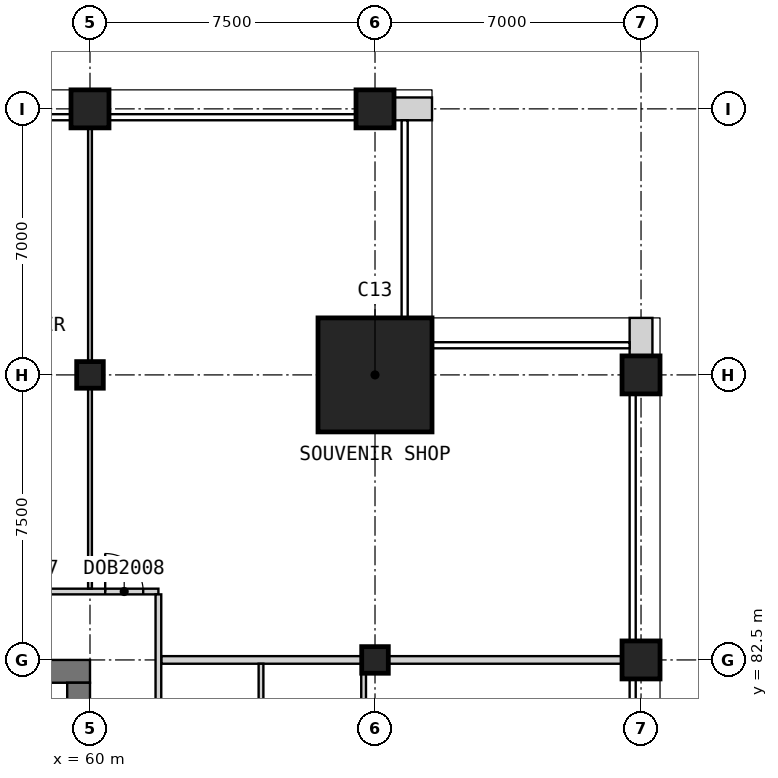
"""IFC4 building model, lengths in metres.
Left out: names, types, materials, properties, quantities, classifications, styles, units other than length and angle.
Written with IfcOpenShell. Run it as: python <this file> out.ifc"""

import sys

from ifc_helpers import new_model, si_unit, direction, frame, frame_2d, origin, origin_2d, place, context, subcontext, project, spatial, rectangle, extrude, element, fill, save


model = new_model("IFC4")
c1 = context("Model", 3, precision=1e-05, world=origin(), true_north=direction((0.0, 1.0)))
c2 = subcontext(c1, "Body", "Model", "MODEL_VIEW")
j1 = project(units=[si_unit("LENGTHUNIT", "METRE"), si_unit("PLANEANGLEUNIT", "RADIAN")], contexts=[c1])
p1 = place(None, origin())
s1 = spatial("IfcSite", under=j1, at=p1, CompositionType="ELEMENT")
p2 = place(p1, origin())
s2 = spatial("IfcBuilding", under=s1, at=p2, CompositionType="ELEMENT")
p3 = place(p2, frame((0.0, 0.0, 308.7)))
s3 = spatial("IfcBuildingStorey", under=s2, at=p3, CompositionType="ELEMENT", Elevation=308.7)
p4 = place(p3, frame((60.0, 90.0, 0.0), z_axis=(0.0, 0.0, 1.0), x_axis=(1.0, 0.0, 0.0)))
e1 = element("IfcColumn", 1, at=p4, inside=s3, PredefinedType="COLUMN", context=c2, shape_type="SweptSolid", body=[
    extrude(rectangle(XDim=0.7, YDim=0.7, at=origin_2d()), origin(), (0.0, 0.0, 1.0), 6.0),
])
p5 = place(p3, frame((60.0, 97.0, 0.0), z_axis=(0.0, 0.0, 1.0), x_axis=(1.0, 0.0, 0.0)))
e2 = element("IfcColumn", 2, at=p5, inside=s3, PredefinedType="COLUMN", context=c2, shape_type="SweptSolid", body=[
    extrude(rectangle(XDim=1.0, YDim=1.0, at=origin_2d()), origin(), (0.0, 0.0, 1.0), 6.0),
])
p6 = place(p3, frame((67.5, 82.5, 0.0), z_axis=(0.0, 0.0, 1.0), x_axis=(1.0, 0.0, 0.0)))
e3 = element("IfcColumn", 3, at=p6, inside=s3, PredefinedType="COLUMN", context=c2, shape_type="SweptSolid", body=[
    extrude(rectangle(XDim=0.7, YDim=0.7, at=origin_2d()), origin(), (0.0, 0.0, 1.0), 6.0),
])
for number, where, z_axis, x_axis in (
    (4, (67.5, 97.0, 0.0), (0.0, 0.0, 1.0), (1.0, 0.0, 0.0)),
    (5, (74.5, 82.5, 0.0), (0.0, 0.0, 1.0), (1.0, 0.0, 0.0)),
    (6, (74.5, 90.0, 0.0), (0.0, 0.0, 1.0), (1.0, 0.0, 0.0)),
):
    element("IfcColumn", number, at=place(p3, frame(where, z_axis=z_axis, x_axis=x_axis)), inside=s3, PredefinedType="COLUMN", context=c2, shape_type="SweptSolid", body=[
        extrude(rectangle(XDim=1.0, YDim=1.0, at=origin_2d()), origin(), (0.0, 0.0, 1.0), 6.0),
    ])
p7 = place(p3, frame((67.5, 90.0, 0.0), z_axis=(0.0, 0.0, 1.0), x_axis=(1.0, 0.0, 0.0)))
e7 = element("IfcColumn", 7, at=p7, inside=s3, PredefinedType="COLUMN", context=c2, shape_type="SweptSolid", body=[
    extrude(rectangle(XDim=3.0, YDim=3.0, at=origin_2d()), origin(), (0.0, 0.0, 1.0), 6.0),
])
p8 = place(p3, frame((30.0, 82.2, 0.0), z_axis=(0.0, 0.0, 1.0), x_axis=(1.0, 0.0, 0.0)))
e8 = element("IfcWall", 8, at=p8, inside=s3, PredefinedType="SHEAR", context=c2, shape_type="SweptSolid", body=[
    extrude(rectangle(XDim=30.0, YDim=0.6, at=frame_2d((15.0, 0.0))), origin(), (0.0, 0.0, 1.0), 6.0),
])
p9 = place(p3, frame((59.7, 60.6, 0.0), z_axis=(0.0, 0.0, 1.0), x_axis=(0.0, 1.0, 0.0)))
e9 = element("IfcWall", 9, at=p9, inside=s3, PredefinedType="SHEAR", context=c2, shape_type="SweptSolid", body=[
    extrude(rectangle(XDim=21.3, YDim=0.6, at=frame_2d((10.65, 0.0))), origin(), (0.0, 0.0, 1.0), 6.0),
])
p10 = place(p9, frame((14.9, 0.0, 0.0)))
e10 = element("IfcOpeningElement", 10, at=p10, cuts=e9, PredefinedType="OPENING", context=c2, shape_type="SweptSolid", body=[
    extrude(rectangle(XDim=1.8, YDim=2.1, at=frame_2d((0.9, 1.05))), frame((0.0, 0.31, 0.0), z_axis=(0.0, -1.0, 0.0), x_axis=(1.0, 0.0, 0.0)), (0.0, 0.0, 1.0), 0.62),
])
for number, where, z_axis, x_axis in (
    (11, (74.5, 90.5, 0.0), (0.0, 0.0, 1.0), (0.0, 1.0, 0.0)),
    (12, (69.0, 97.0, 0.0), (0.0, 0.0, 1.0), (-1.0, 0.0, 0.0)),
):
    element("IfcWall", number, at=place(p3, frame(where, z_axis=z_axis, x_axis=x_axis)), inside=s3, PredefinedType="SOLIDWALL", context=c2, shape_type="SweptSolid", body=[
        extrude(rectangle(XDim=1.0, YDim=0.6, at=frame_2d((0.5, 0.0))), origin(), (0.0, 0.0, 1.0), 5.6),
    ])
p11 = place(p3, frame((61.875, 82.5, 0.0), z_axis=(0.0, 0.0, 1.0), x_axis=(1.0, 0.0, 0.0)))
e13 = element("IfcWall", 13, at=p11, inside=s3, PredefinedType="PARTITIONING", context=c2, shape_type="SweptSolid", body=[
    extrude(rectangle(XDim=13.125, YDim=0.2, at=frame_2d((6.562, 0.0))), origin(), (0.0, 0.0, 1.0), 5.6),
])
p12 = place(p3, frame((33.75, 84.3, 0.0), z_axis=(0.0, 0.0, 1.0), x_axis=(1.0, 0.0, 0.0)))
e14 = element("IfcWall", 14, at=p12, inside=s3, PredefinedType="PARTITIONING", context=c2, shape_type="SweptSolid", body=[
    extrude(rectangle(XDim=28.05, YDim=0.15, at=frame_2d((14.025, 0.0))), origin(), (0.0, 0.0, 1.0), 5.6),
])
p13 = place(p12, frame((2.85, 0.0, 0.0)))
e15 = element("IfcOpeningElement", 15, at=p13, cuts=e14, PredefinedType="OPENING", context=c2, shape_type="SweptSolid", body=[
    extrude(rectangle(XDim=1.8, YDim=2.1, at=frame_2d((0.9, 1.05))), frame((0.0, 0.085, 0.0), z_axis=(0.0, -1.0, 0.0), x_axis=(1.0, 0.0, 0.0)), (0.0, 0.0, 1.0), 0.17),
])
p14 = place(p12, frame((14.1, 0.0, 0.0)))
e16 = element("IfcOpeningElement", 16, at=p14, cuts=e14, PredefinedType="OPENING", context=c2, shape_type="SweptSolid", body=[
    extrude(rectangle(XDim=1.8, YDim=2.1, at=frame_2d((0.9, 1.05))), frame((0.0, 0.085, 0.0), z_axis=(0.0, -1.0, 0.0), x_axis=(1.0, 0.0, 0.0)), (0.0, 0.0, 1.0), 0.17),
])
p15 = place(p12, frame((23.875, 0.0, 0.0)))
e17 = element("IfcOpeningElement", 17, at=p15, cuts=e14, PredefinedType="OPENING", context=c2, shape_type="SweptSolid", body=[
    extrude(rectangle(XDim=1.0, YDim=2.1, at=frame_2d((0.5, 1.05))), frame((0.0, 0.085, 0.0), z_axis=(0.0, -1.0, 0.0), x_axis=(1.0, 0.0, 0.0)), (0.0, 0.0, 1.0), 0.17),
])
p16 = place(p12, frame((26.65, 0.0, 0.0)))
e18 = element("IfcOpeningElement", 18, at=p16, cuts=e14, PredefinedType="OPENING", context=c2, shape_type="SweptSolid", body=[
    extrude(rectangle(XDim=1.0, YDim=2.1, at=frame_2d((0.5, 1.05))), frame((0.0, 0.085, 0.0), z_axis=(0.0, -1.0, 0.0), x_axis=(1.0, 0.0, 0.0)), (0.0, 0.0, 1.0), 0.17),
])
p17 = place(p3, frame((61.8, 58.275, 0.0), z_axis=(0.0, 0.0, 1.0), x_axis=(0.0, 1.0, 0.0)))
e19 = element("IfcWall", 19, at=p17, inside=s3, PredefinedType="PARTITIONING", context=c2, shape_type="SweptSolid", body=[
    extrude(rectangle(XDim=25.95, YDim=0.15, at=frame_2d((12.975, 0.0))), origin(), (0.0, 0.0, 1.0), 5.6),
])
p18 = place(p17, frame((6.85, 0.0, 0.0)))
e20 = element("IfcOpeningElement", 20, at=p18, cuts=e19, PredefinedType="OPENING", context=c2, shape_type="SweptSolid", body=[
    extrude(rectangle(XDim=1.0, YDim=2.1, at=frame_2d((0.5, 1.05))), frame((0.0, 0.085, 0.0), z_axis=(0.0, -1.0, 0.0), x_axis=(1.0, 0.0, 0.0)), (0.0, 0.0, 1.0), 0.17),
])
p19 = place(p17, frame((14.35, 0.0, 0.0)))
e21 = element("IfcOpeningElement", 21, at=p19, cuts=e19, PredefinedType="OPENING", context=c2, shape_type="SweptSolid", body=[
    extrude(rectangle(XDim=1.0, YDim=2.1, at=frame_2d((0.5, 1.05))), frame((0.0, 0.085, 0.0), z_axis=(0.0, -1.0, 0.0), x_axis=(1.0, 0.0, 0.0)), (0.0, 0.0, 1.0), 0.17),
])
p20 = place(p17, frame((18.15, 0.0, 0.0)))
e22 = element("IfcOpeningElement", 22, at=p20, cuts=e19, PredefinedType="OPENING", context=c2, shape_type="SweptSolid", body=[
    extrude(rectangle(XDim=0.9, YDim=2.1, at=frame_2d((0.45, 1.05))), frame((0.0, 0.085, 0.0), z_axis=(0.0, -1.0, 0.0), x_axis=(1.0, 0.0, 0.0)), (0.0, 0.0, 1.0), 0.17),
])
p21 = place(p3, frame((60.0, 84.375, 0.0), z_axis=(0.0, 0.0, 1.0), x_axis=(0.0, 1.0, 0.0)))
e23 = element("IfcWall", 23, at=p21, inside=s3, PredefinedType="PARTITIONING", context=c2, shape_type="SweptSolid", body=[
    extrude(rectangle(XDim=13.125, YDim=0.1, at=frame_2d((6.562, 0.0))), origin(), (0.0, 0.0, 1.0), 5.6),
])
for number, where, z_axis, x_axis in (
    (24, (64.5, 78.812, 0.0), (0.0, 0.0, 1.0), (0.0, 1.0, 0.0)),
    (25, (67.2, 78.812, 0.0), (0.0, 0.0, 1.0), (0.0, 1.0, 0.0)),
):
    element("IfcWall", number, at=place(p3, frame(where, z_axis=z_axis, x_axis=x_axis)), inside=s3, PredefinedType="PARTITIONING", context=c2, shape_type="SweptSolid", body=[
        extrude(rectangle(XDim=3.587, YDim=0.125, at=frame_2d((1.794, 0.0))), origin(), (0.0, 0.0, 1.0), 5.6),
    ])
p22 = place(p16, origin())
e26 = element("IfcDoor", 26, at=p22, inside=s3, OperationType="SINGLE_SWING_LEFT", PredefinedType="DOOR", context=c2, shape_type="SweptSolid", body=[
    extrude(rectangle(XDim=1.0, YDim=2.1, at=frame_2d((0.5, 1.05))), frame((0.0, 0.025, 0.0), z_axis=(0.0, -1.0, 0.0), x_axis=(1.0, 0.0, 0.0)), (0.0, 0.0, 1.0), 0.05),
])
fill(e18, e26)
save(model, sys.argv[1])
